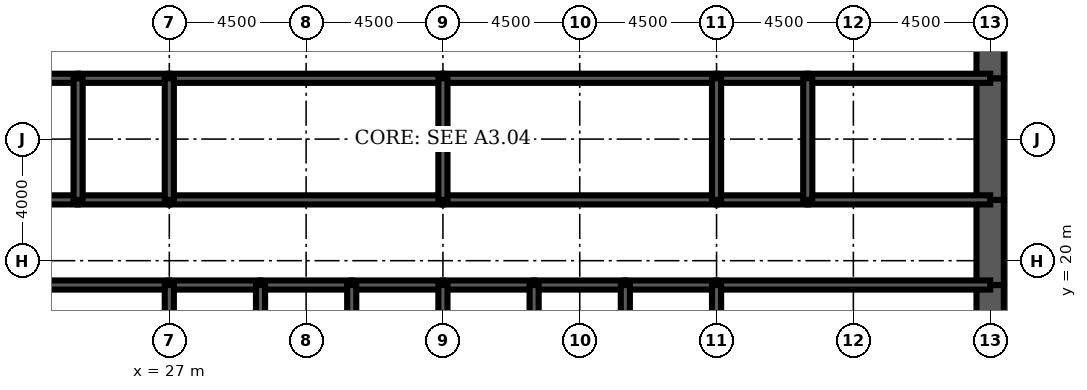
"""IFC4 building model, lengths in metres.
Left out: names, types, materials, properties, quantities, classifications, styles, units other than length and angle.
Written with IfcOpenShell. Run it as: python <this file> out.ifc"""

import sys

from ifc_helpers import new_model, si_unit, direction, frame, frame_2d, origin, place, context, subcontext, project, spatial, rectangle, extrude, element, fill, save


model = new_model("IFC4")
c1 = context("Model", 3, precision=1e-05, world=origin(), true_north=direction((0.0, 1.0)))
c2 = subcontext(c1, "Body", "Model", "MODEL_VIEW")
j1 = project(units=[si_unit("LENGTHUNIT", "METRE"), si_unit("PLANEANGLEUNIT", "RADIAN")], contexts=[c1])
p1 = place(None, origin())
s1 = spatial("IfcSite", under=j1, at=p1, CompositionType="ELEMENT")
p2 = place(p1, origin())
s2 = spatial("IfcBuilding", under=s1, at=p2, CompositionType="ELEMENT")
p3 = place(p2, frame((0.0, 0.0, 13.0)))
s3 = spatial("IfcBuildingStorey", under=s2, at=p3, CompositionType="ELEMENT", Elevation=13.0)
p4 = place(p3, frame((54.0, 16.0, 0.0), z_axis=(0.0, 0.0, 1.0), x_axis=(0.0, 1.0, 0.0)))
e1 = element("IfcWall", 1, at=p4, inside=s3, PredefinedType="SHEAR", context=c2, shape_type="SweptSolid", body=[
    extrude(rectangle(XDim=3.2, YDim=0.9, at=frame_2d((1.6, 0.0))), origin(), (0.0, 0.0, 1.0), 5.0),
])
p5 = place(p3, frame((54.0, 19.2, 0.0), z_axis=(0.0, 0.0, 1.0), x_axis=(0.0, 1.0, 0.0)))
e2 = element("IfcWall", 2, at=p5, inside=s3, PredefinedType="SHEAR", context=c2, shape_type="SweptSolid", body=[
    extrude(rectangle(XDim=2.8, YDim=0.9, at=frame_2d((1.4, 0.0))), origin(), (0.0, 0.0, 1.0), 5.0),
])
p6 = place(p5, frame((0.4, 0.0, 0.0)))
e3 = element("IfcOpeningElement", 3, at=p6, cuts=e2, PredefinedType="OPENING", context=c2, shape_type="SweptSolid", body=[
    extrude(rectangle(XDim=1.8, YDim=2.1, at=frame_2d((0.9, 1.05))), frame((0.0, 0.46, 0.0), z_axis=(0.0, -1.0, 0.0), x_axis=(1.0, 0.0, 0.0)), (0.0, 0.0, 1.0), 0.92),
])
p7 = place(p3, frame((54.0, 22.0, 0.0), z_axis=(0.0, 0.0, 1.0), x_axis=(0.0, 1.0, 0.0)))
e4 = element("IfcWall", 4, at=p7, inside=s3, PredefinedType="SHEAR", context=c2, shape_type="SweptSolid", body=[
    extrude(rectangle(XDim=4.0, YDim=0.9, at=frame_2d((2.0, 0.0))), origin(), (0.0, 0.0, 1.0), 5.0),
])
p8 = place(p3, frame((54.0, 26.0, 0.0), z_axis=(0.0, 0.0, 1.0), x_axis=(0.0, 1.0, 0.0)))
e5 = element("IfcWall", 5, at=p8, inside=s3, PredefinedType="SHEAR", context=c2, shape_type="SweptSolid", body=[
    extrude(rectangle(XDim=2.8, YDim=0.9, at=frame_2d((1.4, 0.0))), origin(), (0.0, 0.0, 1.0), 5.0),
])
p9 = place(p8, frame((0.6, 0.0, 0.0)))
e6 = element("IfcOpeningElement", 6, at=p9, cuts=e5, PredefinedType="OPENING", context=c2, shape_type="SweptSolid", body=[
    extrude(rectangle(XDim=1.8, YDim=2.1, at=frame_2d((0.9, 1.05))), frame((0.0, 0.46, 0.0), z_axis=(0.0, -1.0, 0.0), x_axis=(1.0, 0.0, 0.0)), (0.0, 0.0, 1.0), 0.92),
])
p10 = place(p3, frame((18.0, 19.2, 0.0), z_axis=(0.0, 0.0, 1.0), x_axis=(1.0, 0.0, 0.0)))
e7 = element("IfcWall", 7, at=p10, inside=s3, PredefinedType="SOLIDWALL", context=c2, shape_type="SweptSolid", body=[
    extrude(rectangle(XDim=9.0, YDim=0.3, at=frame_2d((4.5, 0.0))), origin(), (0.0, 0.0, 1.0), 5.0),
])
p11 = place(p10, frame((0.65, 0.0, 0.0)))
e8 = element("IfcOpeningElement", 8, at=p11, cuts=e7, PredefinedType="OPENING", context=c2, shape_type="SweptSolid", body=[
    extrude(rectangle(XDim=1.0, YDim=2.1, at=frame_2d((0.5, 1.05))), frame((0.0, 0.16, 0.0), z_axis=(0.0, -1.0, 0.0), x_axis=(1.0, 0.0, 0.0)), (0.0, 0.0, 1.0), 0.32),
])
p12 = place(p3, frame((27.0, 19.2, 0.0), z_axis=(0.0, 0.0, 1.0), x_axis=(1.0, 0.0, 0.0)))
e9 = element("IfcWall", 9, at=p12, inside=s3, PredefinedType="SOLIDWALL", context=c2, shape_type="SweptSolid", body=[
    extrude(rectangle(XDim=3.0, YDim=0.3, at=frame_2d((1.5, 0.0))), origin(), (0.0, 0.0, 1.0), 5.0),
])
p13 = place(p12, frame((0.95, 0.0, 0.0)))
e10 = element("IfcOpeningElement", 10, at=p13, cuts=e9, PredefinedType="OPENING", context=c2, shape_type="SweptSolid", body=[
    extrude(rectangle(XDim=1.1, YDim=2.2, at=frame_2d((0.55, 1.1))), frame((0.0, 0.16, 0.0), z_axis=(0.0, -1.0, 0.0), x_axis=(1.0, 0.0, 0.0)), (0.0, 0.0, 1.0), 0.32),
])
p14 = place(p3, frame((30.0, 19.2, 0.0), z_axis=(0.0, 0.0, 1.0), x_axis=(1.0, 0.0, 0.0)))
e11 = element("IfcWall", 11, at=p14, inside=s3, PredefinedType="SOLIDWALL", context=c2, shape_type="SweptSolid", body=[
    extrude(rectangle(XDim=3.0, YDim=0.3, at=frame_2d((1.5, 0.0))), origin(), (0.0, 0.0, 1.0), 5.0),
])
p15 = place(p14, frame((0.95, 0.0, 0.0)))
e12 = element("IfcOpeningElement", 12, at=p15, cuts=e11, PredefinedType="OPENING", context=c2, shape_type="SweptSolid", body=[
    extrude(rectangle(XDim=1.1, YDim=2.2, at=frame_2d((0.55, 1.1))), frame((0.0, 0.16, 0.0), z_axis=(0.0, -1.0, 0.0), x_axis=(1.0, 0.0, 0.0)), (0.0, 0.0, 1.0), 0.32),
])
p16 = place(p3, frame((33.0, 19.2, 0.0), z_axis=(0.0, 0.0, 1.0), x_axis=(1.0, 0.0, 0.0)))
e13 = element("IfcWall", 13, at=p16, inside=s3, PredefinedType="SOLIDWALL", context=c2, shape_type="SweptSolid", body=[
    extrude(rectangle(XDim=3.0, YDim=0.3, at=frame_2d((1.5, 0.0))), origin(), (0.0, 0.0, 1.0), 5.0),
])
p17 = place(p16, frame((0.95, 0.0, 0.0)))
e14 = element("IfcOpeningElement", 14, at=p17, cuts=e13, PredefinedType="OPENING", context=c2, shape_type="SweptSolid", body=[
    extrude(rectangle(XDim=1.1, YDim=2.2, at=frame_2d((0.55, 1.1))), frame((0.0, 0.16, 0.0), z_axis=(0.0, -1.0, 0.0), x_axis=(1.0, 0.0, 0.0)), (0.0, 0.0, 1.0), 0.32),
])
p18 = place(p3, frame((36.0, 19.2, 0.0), z_axis=(0.0, 0.0, 1.0), x_axis=(1.0, 0.0, 0.0)))
e15 = element("IfcWall", 15, at=p18, inside=s3, PredefinedType="SOLIDWALL", context=c2, shape_type="SweptSolid", body=[
    extrude(rectangle(XDim=3.0, YDim=0.3, at=frame_2d((1.5, 0.0))), origin(), (0.0, 0.0, 1.0), 5.0),
])
p19 = place(p18, frame((0.95, 0.0, 0.0)))
e16 = element("IfcOpeningElement", 16, at=p19, cuts=e15, PredefinedType="OPENING", context=c2, shape_type="SweptSolid", body=[
    extrude(rectangle(XDim=1.1, YDim=2.2, at=frame_2d((0.55, 1.1))), frame((0.0, 0.16, 0.0), z_axis=(0.0, -1.0, 0.0), x_axis=(1.0, 0.0, 0.0)), (0.0, 0.0, 1.0), 0.32),
])
for number, where, z_axis, x_axis in (
    (17, (39.0, 19.2, 0.0), (0.0, 0.0, 1.0), (1.0, 0.0, 0.0)),
    (18, (42.0, 19.2, 0.0), (0.0, 0.0, 1.0), (1.0, 0.0, 0.0)),
):
    element("IfcWall", number, at=place(p3, frame(where, z_axis=z_axis, x_axis=x_axis)), inside=s3, PredefinedType="SOLIDWALL", context=c2, shape_type="SweptSolid", body=[
        extrude(rectangle(XDim=3.0, YDim=0.3, at=frame_2d((1.5, 0.0))), origin(), (0.0, 0.0, 1.0), 5.0),
    ])
p20 = place(p3, frame((45.0, 19.2, 0.0), z_axis=(0.0, 0.0, 1.0), x_axis=(1.0, 0.0, 0.0)))
e19 = element("IfcWall", 19, at=p20, inside=s3, PredefinedType="SOLIDWALL", context=c2, shape_type="SweptSolid", body=[
    extrude(rectangle(XDim=9.0, YDim=0.3, at=frame_2d((4.5, 0.0))), origin(), (0.0, 0.0, 1.0), 5.0),
])
p21 = place(p20, frame((7.35, 0.0, 0.0)))
e20 = element("IfcOpeningElement", 20, at=p21, cuts=e19, PredefinedType="OPENING", context=c2, shape_type="SweptSolid", body=[
    extrude(rectangle(XDim=1.0, YDim=2.1, at=frame_2d((0.5, 1.05))), frame((0.0, 0.16, 0.0), z_axis=(0.0, -1.0, 0.0), x_axis=(1.0, 0.0, 0.0)), (0.0, 0.0, 1.0), 0.32),
])
p22 = place(p3, frame((18.0, 22.0, 0.0), z_axis=(0.0, 0.0, 1.0), x_axis=(1.0, 0.0, 0.0)))
e21 = element("IfcWall", 21, at=p22, inside=s3, PredefinedType="SOLIDWALL", context=c2, shape_type="SweptSolid", body=[
    extrude(rectangle(XDim=6.0, YDim=0.3, at=frame_2d((3.0, 0.0))), origin(), (0.0, 0.0, 1.0), 5.0),
])
p23 = place(p22, frame((4.4, 0.0, 0.0)))
e22 = element("IfcOpeningElement", 22, at=p23, cuts=e21, PredefinedType="OPENING", context=c2, shape_type="SweptSolid", body=[
    extrude(rectangle(XDim=1.0, YDim=2.1, at=frame_2d((0.5, 1.05))), frame((0.0, 0.16, 0.0), z_axis=(0.0, -1.0, 0.0), x_axis=(1.0, 0.0, 0.0)), (0.0, 0.0, 1.0), 0.32),
])
p24 = place(p22, frame((0.85, 0.0, 0.0)))
e23 = element("IfcOpeningElement", 23, at=p24, cuts=e21, PredefinedType="OPENING", context=c2, shape_type="SweptSolid", body=[
    extrude(rectangle(XDim=1.0, YDim=2.1, at=frame_2d((0.5, 1.05))), frame((0.0, 0.16, 0.0), z_axis=(0.0, -1.0, 0.0), x_axis=(1.0, 0.0, 0.0)), (0.0, 0.0, 1.0), 0.32),
])
p25 = place(p3, frame((24.0, 22.0, 0.0), z_axis=(0.0, 0.0, 1.0), x_axis=(1.0, 0.0, 0.0)))
e24 = element("IfcWall", 24, at=p25, inside=s3, PredefinedType="SOLIDWALL", context=c2, shape_type="SweptSolid", body=[
    extrude(rectangle(XDim=3.0, YDim=0.3, at=frame_2d((1.5, 0.0))), origin(), (0.0, 0.0, 1.0), 5.0),
])
p26 = place(p25, frame((1.0, 0.0, 0.0)))
e25 = element("IfcOpeningElement", 25, at=p26, cuts=e24, PredefinedType="OPENING", context=c2, shape_type="SweptSolid", body=[
    extrude(rectangle(XDim=1.0, YDim=2.1, at=frame_2d((0.5, 1.05))), frame((0.0, 0.16, 0.0), z_axis=(0.0, -1.0, 0.0), x_axis=(1.0, 0.0, 0.0)), (0.0, 0.0, 1.0), 0.32),
])
p27 = place(p3, frame((27.0, 22.0, 0.0), z_axis=(0.0, 0.0, 1.0), x_axis=(1.0, 0.0, 0.0)))
e26 = element("IfcWall", 26, at=p27, inside=s3, PredefinedType="SOLIDWALL", context=c2, shape_type="SweptSolid", body=[
    extrude(rectangle(XDim=9.0, YDim=0.3, at=frame_2d((4.5, 0.0))), origin(), (0.0, 0.0, 1.0), 5.0),
])
p28 = place(p27, frame((4.0, 0.0, 0.0)))
e27 = element("IfcOpeningElement", 27, at=p28, cuts=e26, PredefinedType="OPENING", context=c2, shape_type="SweptSolid", body=[
    extrude(rectangle(XDim=1.0, YDim=2.1, at=frame_2d((0.5, 1.05))), frame((0.0, 0.16, 0.0), z_axis=(0.0, -1.0, 0.0), x_axis=(1.0, 0.0, 0.0)), (0.0, 0.0, 1.0), 0.32),
])
p29 = place(p3, frame((36.0, 22.0, 0.0), z_axis=(0.0, 0.0, 1.0), x_axis=(1.0, 0.0, 0.0)))
e28 = element("IfcWall", 28, at=p29, inside=s3, PredefinedType="SOLIDWALL", context=c2, shape_type="SweptSolid", body=[
    extrude(rectangle(XDim=9.0, YDim=0.3, at=frame_2d((4.5, 0.0))), origin(), (0.0, 0.0, 1.0), 5.0),
])
p30 = place(p29, frame((4.0, 0.0, 0.0)))
e29 = element("IfcOpeningElement", 29, at=p30, cuts=e28, PredefinedType="OPENING", context=c2, shape_type="SweptSolid", body=[
    extrude(rectangle(XDim=1.0, YDim=2.1, at=frame_2d((0.5, 1.05))), frame((0.0, 0.16, 0.0), z_axis=(0.0, -1.0, 0.0), x_axis=(1.0, 0.0, 0.0)), (0.0, 0.0, 1.0), 0.32),
])
p31 = place(p3, frame((45.0, 22.0, 0.0), z_axis=(0.0, 0.0, 1.0), x_axis=(1.0, 0.0, 0.0)))
e30 = element("IfcWall", 30, at=p31, inside=s3, PredefinedType="SOLIDWALL", context=c2, shape_type="SweptSolid", body=[
    extrude(rectangle(XDim=3.0, YDim=0.3, at=frame_2d((1.5, 0.0))), origin(), (0.0, 0.0, 1.0), 5.0),
])
p32 = place(p31, frame((1.0, 0.0, 0.0)))
e31 = element("IfcOpeningElement", 31, at=p32, cuts=e30, PredefinedType="OPENING", context=c2, shape_type="SweptSolid", body=[
    extrude(rectangle(XDim=1.0, YDim=2.1, at=frame_2d((0.5, 1.05))), frame((0.0, 0.16, 0.0), z_axis=(0.0, -1.0, 0.0), x_axis=(1.0, 0.0, 0.0)), (0.0, 0.0, 1.0), 0.32),
])
p33 = place(p3, frame((48.0, 22.0, 0.0), z_axis=(0.0, 0.0, 1.0), x_axis=(1.0, 0.0, 0.0)))
e32 = element("IfcWall", 32, at=p33, inside=s3, PredefinedType="SOLIDWALL", context=c2, shape_type="SweptSolid", body=[
    extrude(rectangle(XDim=6.0, YDim=0.3, at=frame_2d((3.0, 0.0))), origin(), (0.0, 0.0, 1.0), 5.0),
])
p34 = place(p33, frame((2.0, 0.0, 0.0)))
e33 = element("IfcOpeningElement", 33, at=p34, cuts=e32, PredefinedType="OPENING", context=c2, shape_type="SweptSolid", body=[
    extrude(rectangle(XDim=1.0, YDim=2.1, at=frame_2d((0.5, 1.05))), frame((0.0, 0.16, 0.0), z_axis=(0.0, -1.0, 0.0), x_axis=(1.0, 0.0, 0.0)), (0.0, 0.0, 1.0), 0.32),
])
p35 = place(p33, frame((4.15, 0.0, 0.0)))
e34 = element("IfcOpeningElement", 34, at=p35, cuts=e32, PredefinedType="OPENING", context=c2, shape_type="SweptSolid", body=[
    extrude(rectangle(XDim=1.0, YDim=2.1, at=frame_2d((0.5, 1.05))), frame((0.0, 0.16, 0.0), z_axis=(0.0, -1.0, 0.0), x_axis=(1.0, 0.0, 0.0)), (0.0, 0.0, 1.0), 0.32),
])
p36 = place(p3, frame((18.0, 26.0, 0.0), z_axis=(0.0, 0.0, 1.0), x_axis=(1.0, 0.0, 0.0)))
e35 = element("IfcWall", 35, at=p36, inside=s3, PredefinedType="SOLIDWALL", context=c2, shape_type="SweptSolid", body=[
    extrude(rectangle(XDim=6.0, YDim=0.3, at=frame_2d((3.0, 0.0))), origin(), (0.0, 0.0, 1.0), 5.0),
])
p37 = place(p3, frame((24.0, 26.0, 0.0), z_axis=(0.0, 0.0, 1.0), x_axis=(1.0, 0.0, 0.0)))
e36 = element("IfcWall", 36, at=p37, inside=s3, PredefinedType="SOLIDWALL", context=c2, shape_type="SweptSolid", body=[
    extrude(rectangle(XDim=3.0, YDim=0.3, at=frame_2d((1.5, 0.0))), origin(), (0.0, 0.0, 1.0), 5.0),
])
for number, where, z_axis, x_axis in (
    (37, (27.0, 26.0, 0.0), (0.0, 0.0, 1.0), (1.0, 0.0, 0.0)),
    (38, (36.0, 26.0, 0.0), (0.0, 0.0, 1.0), (1.0, 0.0, 0.0)),
):
    element("IfcWall", number, at=place(p3, frame(where, z_axis=z_axis, x_axis=x_axis)), inside=s3, PredefinedType="SOLIDWALL", context=c2, shape_type="SweptSolid", body=[
        extrude(rectangle(XDim=9.0, YDim=0.3, at=frame_2d((4.5, 0.0))), origin(), (0.0, 0.0, 1.0), 5.0),
    ])
p38 = place(p3, frame((45.0, 26.0, 0.0), z_axis=(0.0, 0.0, 1.0), x_axis=(1.0, 0.0, 0.0)))
e39 = element("IfcWall", 39, at=p38, inside=s3, PredefinedType="SOLIDWALL", context=c2, shape_type="SweptSolid", body=[
    extrude(rectangle(XDim=3.0, YDim=0.3, at=frame_2d((1.5, 0.0))), origin(), (0.0, 0.0, 1.0), 5.0),
])
p39 = place(p3, frame((48.0, 26.0, 0.0), z_axis=(0.0, 0.0, 1.0), x_axis=(1.0, 0.0, 0.0)))
e40 = element("IfcWall", 40, at=p39, inside=s3, PredefinedType="SOLIDWALL", context=c2, shape_type="SweptSolid", body=[
    extrude(rectangle(XDim=6.0, YDim=0.3, at=frame_2d((3.0, 0.0))), origin(), (0.0, 0.0, 1.0), 5.0),
])
for number, where, z_axis, x_axis in (
    (41, (27.0, 16.0, 0.0), (0.0, 0.0, 1.0), (0.0, 1.0, 0.0)),
    (42, (30.0, 16.0, 0.0), (0.0, 0.0, 1.0), (0.0, 1.0, 0.0)),
    (43, (33.0, 16.0, 0.0), (0.0, 0.0, 1.0), (0.0, 1.0, 0.0)),
    (44, (36.0, 16.0, 0.0), (0.0, 0.0, 1.0), (0.0, 1.0, 0.0)),
    (45, (39.0, 16.0, 0.0), (0.0, 0.0, 1.0), (0.0, 1.0, 0.0)),
    (46, (42.0, 16.0, 0.0), (0.0, 0.0, 1.0), (0.0, 1.0, 0.0)),
    (47, (45.0, 16.0, 0.0), (0.0, 0.0, 1.0), (0.0, 1.0, 0.0)),
):
    element("IfcWall", number, at=place(p3, frame(where, z_axis=z_axis, x_axis=x_axis)), inside=s3, PredefinedType="SOLIDWALL", context=c2, shape_type="SweptSolid", body=[
        extrude(rectangle(XDim=3.2, YDim=0.3, at=frame_2d((1.6, 0.0))), origin(), (0.0, 0.0, 1.0), 5.0),
    ])
for number, where, z_axis, x_axis in (
    (48, (24.0, 22.0, 0.0), (0.0, 0.0, 1.0), (0.0, 1.0, 0.0)),
    (49, (27.0, 22.0, 0.0), (0.0, 0.0, 1.0), (0.0, 1.0, 0.0)),
    (50, (36.0, 22.0, 0.0), (0.0, 0.0, 1.0), (0.0, 1.0, 0.0)),
    (51, (45.0, 22.0, 0.0), (0.0, 0.0, 1.0), (0.0, 1.0, 0.0)),
    (52, (48.0, 22.0, 0.0), (0.0, 0.0, 1.0), (0.0, 1.0, 0.0)),
):
    element("IfcWall", number, at=place(p3, frame(where, z_axis=z_axis, x_axis=x_axis)), inside=s3, PredefinedType="SOLIDWALL", context=c2, shape_type="SweptSolid", body=[
        extrude(rectangle(XDim=4.0, YDim=0.3, at=frame_2d((2.0, 0.0))), origin(), (0.0, 0.0, 1.0), 5.0),
    ])
p40 = place(p3, frame((42.0, 22.15, 0.0), z_axis=(0.0, 0.0, 1.0), x_axis=(0.0, 1.0, 0.0)))
e53 = element("IfcWall", 53, at=p40, inside=s3, PredefinedType="PARTITIONING", context=c2, shape_type="SweptSolid", body=[
    extrude(rectangle(XDim=3.7, YDim=0.15, at=frame_2d((1.85, 0.0))), origin(), (0.0, 0.0, 1.0), 3.0),
])
p41 = place(p40, frame((2.2, 0.0, 0.0)))
e54 = element("IfcOpeningElement", 54, at=p41, cuts=e53, PredefinedType="OPENING", context=c2, shape_type="SweptSolid", body=[
    extrude(rectangle(XDim=1.0, YDim=2.1, at=frame_2d((0.5, 1.05))), frame((0.0, 0.085, 0.0), z_axis=(0.0, -1.0, 0.0), x_axis=(1.0, 0.0, 0.0)), (0.0, 0.0, 1.0), 0.17),
])
p42 = place(p3, frame((51.675, 22.15, 0.0), z_axis=(0.0, 0.0, 1.0), x_axis=(0.0, 1.0, 0.0)))
e55 = element("IfcWall", 55, at=p42, inside=s3, PredefinedType="PARTITIONING", context=c2, shape_type="SweptSolid", body=[
    extrude(rectangle(XDim=3.7, YDim=0.15, at=frame_2d((1.85, 0.0))), origin(), (0.0, 0.0, 1.0), 3.0),
])
p43 = place(p3, frame((47.7, 19.35, 0.0), z_axis=(0.0, 0.0, 1.0), x_axis=(0.0, 1.0, 0.0)))
e56 = element("IfcWall", 56, at=p43, inside=s3, PredefinedType="PARTITIONING", context=c2, shape_type="SweptSolid", body=[
    extrude(rectangle(XDim=2.5, YDim=0.15, at=frame_2d((1.25, 0.0))), origin(), (0.0, 0.0, 1.0), 3.0),
])
p44 = place(p43, frame((1.15, 0.0, 0.0)))
e57 = element("IfcOpeningElement", 57, at=p44, cuts=e56, PredefinedType="OPENING", context=c2, shape_type="SweptSolid", body=[
    extrude(rectangle(XDim=1.0, YDim=2.1, at=frame_2d((0.5, 1.05))), frame((0.0, 0.085, 0.0), z_axis=(0.0, -1.0, 0.0), x_axis=(1.0, 0.0, 0.0)), (0.0, 0.0, 1.0), 0.17),
])
p45 = place(p41, origin())
e58 = element("IfcDoor", 58, at=p45, inside=s3, OperationType="SINGLE_SWING_RIGHT", PredefinedType="DOOR", context=c2, shape_type="SweptSolid", body=[
    extrude(rectangle(XDim=1.0, YDim=2.1, at=frame_2d((0.5, 1.05))), frame((0.0, 0.025, 0.0), z_axis=(0.0, -1.0, 0.0), x_axis=(1.0, 0.0, 0.0)), (0.0, 0.0, 1.0), 0.05),
])
fill(e54, e58)
p46 = place(p44, origin())
e59 = element("IfcDoor", 59, at=p46, inside=s3, OperationType="SINGLE_SWING_RIGHT", PredefinedType="DOOR", context=c2, shape_type="SweptSolid", body=[
    extrude(rectangle(XDim=1.0, YDim=2.1, at=frame_2d((0.5, 1.05))), frame((0.0, 0.025, 0.0), z_axis=(0.0, -1.0, 0.0), x_axis=(1.0, 0.0, 0.0)), (0.0, 0.0, 1.0), 0.05),
])
fill(e57, e59)
p47 = place(p13, origin())
e60 = element("IfcDoor", 60, at=p47, inside=s3, OperationType="DOUBLE_DOOR_SLIDING", PredefinedType="USERDEFINED", context=c2, shape_type="SweptSolid", body=[
    extrude(rectangle(XDim=1.1, YDim=2.2, at=frame_2d((0.55, 1.1))), frame((0.0, 0.025, 0.0), z_axis=(0.0, -1.0, 0.0), x_axis=(1.0, 0.0, 0.0)), (0.0, 0.0, 1.0), 0.05),
])
fill(e10, e60)
p48 = place(p15, origin())
e61 = element("IfcDoor", 61, at=p48, inside=s3, OperationType="DOUBLE_DOOR_SLIDING", PredefinedType="USERDEFINED", context=c2, shape_type="SweptSolid", body=[
    extrude(rectangle(XDim=1.1, YDim=2.2, at=frame_2d((0.55, 1.1))), frame((0.0, 0.025, 0.0), z_axis=(0.0, -1.0, 0.0), x_axis=(1.0, 0.0, 0.0)), (0.0, 0.0, 1.0), 0.05),
])
fill(e12, e61)
p49 = place(p17, origin())
e62 = element("IfcDoor", 62, at=p49, inside=s3, OperationType="DOUBLE_DOOR_SLIDING", PredefinedType="USERDEFINED", context=c2, shape_type="SweptSolid", body=[
    extrude(rectangle(XDim=1.1, YDim=2.2, at=frame_2d((0.55, 1.1))), frame((0.0, 0.025, 0.0), z_axis=(0.0, -1.0, 0.0), x_axis=(1.0, 0.0, 0.0)), (0.0, 0.0, 1.0), 0.05),
])
fill(e14, e62)
p50 = place(p19, origin())
e63 = element("IfcDoor", 63, at=p50, inside=s3, OperationType="DOUBLE_DOOR_SLIDING", PredefinedType="USERDEFINED", context=c2, shape_type="SweptSolid", body=[
    extrude(rectangle(XDim=1.1, YDim=2.2, at=frame_2d((0.55, 1.1))), frame((0.0, 0.025, 0.0), z_axis=(0.0, -1.0, 0.0), x_axis=(1.0, 0.0, 0.0)), (0.0, 0.0, 1.0), 0.05),
])
fill(e16, e63)
p51 = place(p21, origin())
e64 = element("IfcDoor", 64, at=p51, inside=s3, OperationType="SINGLE_SWING_RIGHT", PredefinedType="DOOR", context=c2, shape_type="SweptSolid", body=[
    extrude(rectangle(XDim=1.0, YDim=2.1, at=frame_2d((0.5, 1.05))), frame((0.0, 0.025, 0.0), z_axis=(0.0, -1.0, 0.0), x_axis=(1.0, 0.0, 0.0)), (0.0, 0.0, 1.0), 0.05),
])
fill(e20, e64)
p52 = place(p6, origin())
e65 = element("IfcDoor", 65, at=p52, inside=s3, OperationType="SINGLE_SWING_LEFT", PredefinedType="DOOR", context=c2, shape_type="SweptSolid", body=[
    extrude(rectangle(XDim=1.8, YDim=2.1, at=frame_2d((0.9, 1.05))), frame((0.0, 0.45, 0.0), z_axis=(0.0, -1.0, 0.0), x_axis=(1.0, 0.0, 0.0)), (0.0, 0.0, 1.0), 0.899),
])
fill(e3, e65)
p53 = place(p9, origin())
e66 = element("IfcDoor", 66, at=p53, inside=s3, OperationType="SINGLE_SWING_LEFT", PredefinedType="DOOR", context=c2, shape_type="SweptSolid", body=[
    extrude(rectangle(XDim=1.8, YDim=2.1, at=frame_2d((0.9, 1.05))), frame((0.0, 0.45, 0.0), z_axis=(0.0, -1.0, 0.0), x_axis=(1.0, 0.0, 0.0)), (0.0, 0.0, 1.0), 0.899),
])
fill(e6, e66)
p54 = place(p23, origin())
e67 = element("IfcDoor", 67, at=p54, inside=s3, OperationType="SINGLE_SWING_RIGHT", PredefinedType="DOOR", context=c2, shape_type="SweptSolid", body=[
    extrude(rectangle(XDim=1.0, YDim=2.1, at=frame_2d((0.5, 1.05))), frame((0.0, 0.025, 0.0), z_axis=(0.0, -1.0, 0.0), x_axis=(1.0, 0.0, 0.0)), (0.0, 0.0, 1.0), 0.05),
])
fill(e22, e67)
p55 = place(p26, origin())
e68 = element("IfcDoor", 68, at=p55, inside=s3, OperationType="SINGLE_SWING_LEFT", PredefinedType="DOOR", context=c2, shape_type="SweptSolid", body=[
    extrude(rectangle(XDim=1.0, YDim=2.1, at=frame_2d((0.5, 1.05))), frame((0.0, 0.025, 0.0), z_axis=(0.0, -1.0, 0.0), x_axis=(1.0, 0.0, 0.0)), (0.0, 0.0, 1.0), 0.05),
])
fill(e25, e68)
p56 = place(p28, origin())
e69 = element("IfcDoor", 69, at=p56, inside=s3, OperationType="SINGLE_SWING_LEFT", PredefinedType="DOOR", context=c2, shape_type="SweptSolid", body=[
    extrude(rectangle(XDim=1.0, YDim=2.1, at=frame_2d((0.5, 1.05))), frame((0.0, 0.025, 0.0), z_axis=(0.0, -1.0, 0.0), x_axis=(1.0, 0.0, 0.0)), (0.0, 0.0, 1.0), 0.05),
])
fill(e27, e69)
p57 = place(p30, origin())
e70 = element("IfcDoor", 70, at=p57, inside=s3, OperationType="SINGLE_SWING_LEFT", PredefinedType="DOOR", context=c2, shape_type="SweptSolid", body=[
    extrude(rectangle(XDim=1.0, YDim=2.1, at=frame_2d((0.5, 1.05))), frame((0.0, 0.025, 0.0), z_axis=(0.0, -1.0, 0.0), x_axis=(1.0, 0.0, 0.0)), (0.0, 0.0, 1.0), 0.05),
])
fill(e29, e70)
p58 = place(p32, origin())
e71 = element("IfcDoor", 71, at=p58, inside=s3, OperationType="SINGLE_SWING_LEFT", PredefinedType="DOOR", context=c2, shape_type="SweptSolid", body=[
    extrude(rectangle(XDim=1.0, YDim=2.1, at=frame_2d((0.5, 1.05))), frame((0.0, 0.025, 0.0), z_axis=(0.0, -1.0, 0.0), x_axis=(1.0, 0.0, 0.0)), (0.0, 0.0, 1.0), 0.05),
])
fill(e31, e71)
p59 = place(p34, origin())
e72 = element("IfcDoor", 72, at=p59, inside=s3, OperationType="SINGLE_SWING_LEFT", PredefinedType="DOOR", context=c2, shape_type="SweptSolid", body=[
    extrude(rectangle(XDim=1.0, YDim=2.1, at=frame_2d((0.5, 1.05))), frame((0.0, 0.025, 0.0), z_axis=(0.0, -1.0, 0.0), x_axis=(1.0, 0.0, 0.0)), (0.0, 0.0, 1.0), 0.05),
])
fill(e33, e72)
p60 = place(p35, origin())
e73 = element("IfcDoor", 73, at=p60, inside=s3, OperationType="SINGLE_SWING_RIGHT", PredefinedType="DOOR", context=c2, shape_type="SweptSolid", body=[
    extrude(rectangle(XDim=1.0, YDim=2.1, at=frame_2d((0.5, 1.05))), frame((0.0, 0.025, 0.0), z_axis=(0.0, -1.0, 0.0), x_axis=(1.0, 0.0, 0.0)), (0.0, 0.0, 1.0), 0.05),
])
fill(e34, e73)
save(model, sys.argv[1])
